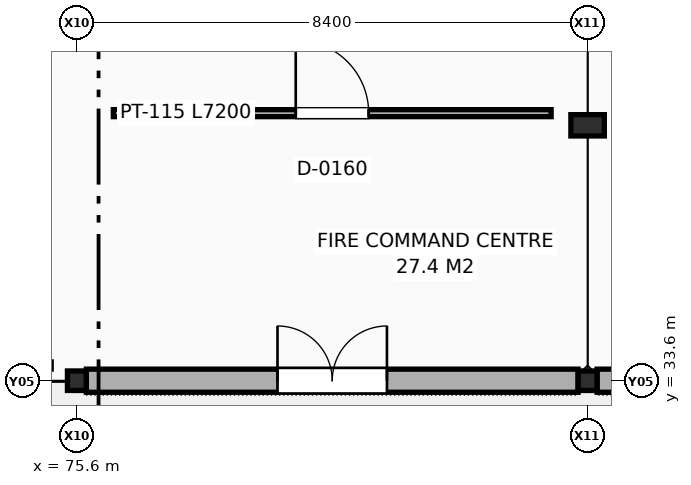
"""IFC4 building model, lengths in metres.
Left out: names, types, materials, properties, quantities, classifications, styles, units other than length and angle.
Written with IfcOpenShell. Run it as: python <this file> out.ifc"""

import sys

from ifc_helpers import new_model, si_unit, direction, frame, frame_2d, origin, origin_2d, place, context, subcontext, project, spatial, rectangle, i_section, extrude, element, fill, save


model = new_model("IFC4")
c1 = context("Model", 3, precision=1e-05, world=origin(), true_north=direction((0.0, 1.0)))
c2 = subcontext(c1, "Body", "Model", "MODEL_VIEW")
j1 = project(units=[si_unit("LENGTHUNIT", "METRE"), si_unit("PLANEANGLEUNIT", "RADIAN")], contexts=[c1])
p1 = place(None, origin())
s1 = spatial("IfcSite", under=j1, at=p1, CompositionType="ELEMENT")
p2 = place(p1, origin())
s2 = spatial("IfcBuilding", under=s1, at=p2, CompositionType="ELEMENT")
p3 = place(p2, origin())
s3 = spatial("IfcBuildingStorey", under=s2, at=p3, CompositionType="ELEMENT", Elevation=0.0)
for number, where, z_axis, x_axis in (
    (1, (75.6, 33.6, 0.0), (0.0, 0.0, 1.0), (1.0, 0.0, 0.0)),
    (2, (84.0, 33.6, 0.0), (0.0, 0.0, 1.0), (1.0, 0.0, 0.0)),
):
    element("IfcColumn", number, at=place(p3, frame(where, z_axis=z_axis, x_axis=x_axis)), inside=s3, PredefinedType="COLUMN", context=c2, shape_type="SweptSolid", body=[
        extrude(i_section(OverallWidth=0.309, OverallDepth=0.321, WebThickness=0.014, FlangeThickness=0.022, FilletRadius=0.015, at=origin_2d()), origin(), (0.0, 0.0, 1.0), 5.4),
    ])
p4 = place(p3, frame((84.0, 37.8, 0.0), z_axis=(0.0, 0.0, 1.0), x_axis=(1.0, 0.0, 0.0)))
e3 = element("IfcColumn", 3, at=p4, inside=s3, PredefinedType="PILASTER", context=c2, shape_type="SweptSolid", body=[
    extrude(rectangle(XDim=0.55, YDim=0.35, at=origin_2d()), origin(), (0.0, 0.0, 1.0), 5.4),
])
p5 = place(p3, frame((84.156, 33.6, 0.0), z_axis=(0.0, 0.0, 1.0), x_axis=(1.0, 0.0, 0.0)))
e4 = element("IfcWall", 4, at=p5, inside=s3, PredefinedType="SOLIDWALL", context=c2, shape_type="SweptSolid", body=[
    extrude(rectangle(XDim=9.887, YDim=0.38, at=frame_2d((4.943, 0.0))), origin(), (0.0, 0.0, 1.0), 4.703),
])
p6 = place(p5, frame((3.743, 0.0, 0.0)))
e5 = element("IfcOpeningElement", 5, at=p6, cuts=e4, PredefinedType="OPENING", context=c2, shape_type="SweptSolid", body=[
    extrude(rectangle(XDim=2.4, YDim=2.8, at=frame_2d((1.2, 1.4))), frame((0.0, 0.2, 0.0), z_axis=(0.0, -1.0, 0.0), x_axis=(1.0, 0.0, 0.0)), (0.0, 0.0, 1.0), 0.4),
])
p7 = place(p3, frame((75.757, 33.6, 0.0), z_axis=(0.0, 0.0, 1.0), x_axis=(1.0, 0.0, 0.0)))
e6 = element("IfcWall", 6, at=p7, inside=s3, PredefinedType="SOLIDWALL", context=c2, shape_type="SweptSolid", body=[
    extrude(rectangle(XDim=8.087, YDim=0.38, at=frame_2d((4.043, 0.0))), origin(), (0.0, 0.0, 1.0), 4.703),
])
p8 = place(p7, frame((3.143, 0.0, 0.0)))
e7 = element("IfcOpeningElement", 7, at=p8, cuts=e6, PredefinedType="OPENING", context=c2, shape_type="SweptSolid", body=[
    extrude(rectangle(XDim=1.8, YDim=2.4, at=frame_2d((0.9, 1.2))), frame((0.0, 0.2, 0.0), z_axis=(0.0, -1.0, 0.0), x_axis=(1.0, 0.0, 0.0)), (0.0, 0.0, 1.0), 0.4),
])
p9 = place(p3, frame((76.2, 38.0, 0.0), z_axis=(0.0, 0.0, 1.0), x_axis=(1.0, 0.0, 0.0)))
e8 = element("IfcWall", 8, at=p9, inside=s3, PredefinedType="PARTITIONING", context=c2, shape_type="SweptSolid", body=[
    extrude(rectangle(XDim=7.2, YDim=0.115, at=frame_2d((3.6, 0.0))), origin(), (0.0, 0.0, 1.0), 5.06),
])
p10 = place(p9, frame((3.0, 0.0, 0.0)))
e9 = element("IfcOpeningElement", 9, at=p10, cuts=e8, PredefinedType="OPENING", context=c2, shape_type="SweptSolid", body=[
    extrude(rectangle(XDim=1.2, YDim=2.2, at=frame_2d((0.6, 1.1))), frame((0.0, 0.067, 0.0), z_axis=(0.0, -1.0, 0.0), x_axis=(1.0, 0.0, 0.0)), (0.0, 0.0, 1.0), 0.135),
])
p11 = place(p8, frame((1.8, 0.0, 0.0), z_axis=(0.0, 0.0, 1.0), x_axis=(-1.0, 0.0, 0.0)))
e10 = element("IfcDoor", 10, at=p11, inside=s3, OperationType="DOUBLE_DOOR_SINGLE_SWING", PredefinedType="DOOR", context=c2, shape_type="SweptSolid", body=[
    extrude(rectangle(XDim=1.8, YDim=2.4, at=frame_2d((0.9, 1.2))), frame((0.0, 0.025, 0.0), z_axis=(0.0, -1.0, 0.0), x_axis=(1.0, 0.0, 0.0)), (0.0, 0.0, 1.0), 0.05),
])
fill(e7, e10)
p12 = place(p10, origin())
e11 = element("IfcDoor", 11, at=p12, inside=s3, OperationType="SINGLE_SWING_LEFT", PredefinedType="DOOR", context=c2, shape_type="SweptSolid", body=[
    extrude(rectangle(XDim=1.2, YDim=2.2, at=frame_2d((0.6, 1.1))), frame((0.0, 0.025, 0.0), z_axis=(0.0, -1.0, 0.0), x_axis=(1.0, 0.0, 0.0)), (0.0, 0.0, 1.0), 0.05),
])
fill(e9, e11)
save(model, sys.argv[1])
